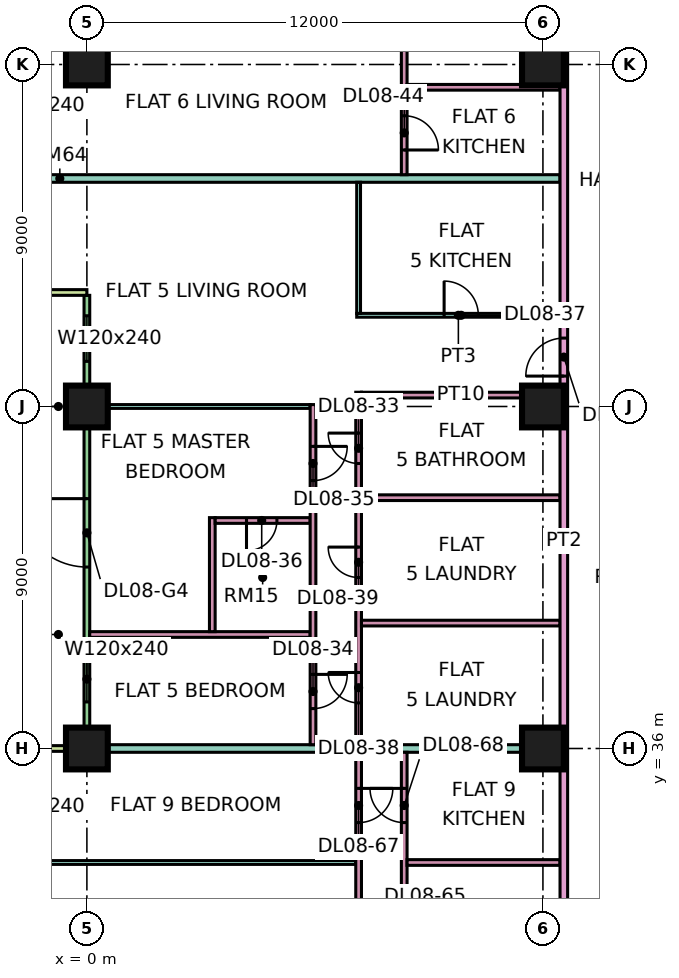
"""IFC4 building model, lengths in metres.
Left out: names, types, materials, properties, quantities, classifications, styles, units other than length and angle.
Written with IfcOpenShell. Run it as: python <this file> out.ifc"""

import sys

from ifc_helpers import new_model, si_unit, direction, frame, frame_2d, origin, origin_2d, place, context, subcontext, project, spatial, rectangle, extrude, element, fill, save


model = new_model("IFC4")
c1 = context("Model", 3, precision=1e-05, world=origin(), true_north=direction((0.0, 1.0)))
c2 = subcontext(c1, "Body", "Model", "MODEL_VIEW")
j1 = project(units=[si_unit("LENGTHUNIT", "METRE"), si_unit("PLANEANGLEUNIT", "RADIAN")], contexts=[c1])
p1 = place(None, origin())
s1 = spatial("IfcSite", under=j1, at=p1, CompositionType="ELEMENT")
p2 = place(p1, origin())
s2 = spatial("IfcBuilding", under=s1, at=p2, CompositionType="ELEMENT")
p3 = place(p2, frame((0.0, 0.0, 45.15)))
s3 = spatial("IfcBuildingStorey", under=s2, at=p3, CompositionType="ELEMENT", Elevation=45.15)
p4 = place(p3, frame((0.0, 36.0, 0.0), z_axis=(0.0, 0.0, 1.0), x_axis=(1.0, 0.0, 0.0)))
e1 = element("IfcColumn", 1, at=p4, inside=s3, PredefinedType="COLUMN", context=c2, shape_type="SweptSolid", body=[
    extrude(rectangle(XDim=1.1, YDim=1.1, at=origin_2d()), origin(), (0.0, 0.0, 1.0), 3.75),
])
for number, where, z_axis, x_axis in (
    (2, (0.0, 45.0, 0.0), (0.0, 0.0, 1.0), (1.0, 0.0, 0.0)),
    (3, (0.0, 54.0, 0.0), (0.0, 0.0, 1.0), (1.0, 0.0, 0.0)),
    (4, (12.0, 36.0, 0.0), (0.0, 0.0, 1.0), (1.0, 0.0, 0.0)),
    (5, (12.0, 45.0, 0.0), (0.0, 0.0, 1.0), (1.0, 0.0, 0.0)),
    (6, (12.0, 54.0, 0.0), (0.0, 0.0, 1.0), (1.0, 0.0, 0.0)),
):
    element("IfcColumn", number, at=place(p3, frame(where, z_axis=z_axis, x_axis=x_axis)), inside=s3, PredefinedType="COLUMN", context=c2, shape_type="SweptSolid", body=[
        extrude(rectangle(XDim=1.1, YDim=1.1, at=origin_2d()), origin(), (0.0, 0.0, 1.0), 3.75),
    ])
p5 = place(p3, frame((0.0, 47.925, 0.0), z_axis=(0.0, 0.0, 1.0), x_axis=(0.0, -1.0, 0.0)))
e7 = element("IfcWall", 7, at=p5, inside=s3, PredefinedType="SOLIDWALL", context=c2, shape_type="SweptSolid", body=[
    extrude(rectangle(XDim=11.85, YDim=0.15, at=frame_2d((5.925, 0.0))), origin(), (0.0, 0.0, 1.0), 3.35),
])
p6 = place(p5, frame((0.538, 0.0, 0.45)))
e8 = element("IfcOpeningElement", 8, at=p6, cuts=e7, PredefinedType="OPENING", context=c2, shape_type="SweptSolid", body=[
    extrude(rectangle(XDim=1.2, YDim=2.4, at=frame_2d((0.6, 1.2))), frame((0.0, 0.085, 0.0), z_axis=(0.0, -1.0, 0.0), x_axis=(1.0, 0.0, 0.0)), (0.0, 0.0, 1.0), 0.17),
])
p7 = place(p5, frame((5.35, 0.0, 0.0)))
e9 = element("IfcOpeningElement", 9, at=p7, cuts=e7, PredefinedType="OPENING", context=c2, shape_type="SweptSolid", body=[
    extrude(rectangle(XDim=1.8, YDim=2.4, at=frame_2d((0.9, 1.2))), frame((0.0, 0.085, 0.0), z_axis=(0.0, -1.0, 0.0), x_axis=(1.0, 0.0, 0.0)), (0.0, 0.0, 1.0), 0.17),
])
p8 = place(p5, frame((9.5, 0.0, 0.45)))
e10 = element("IfcOpeningElement", 10, at=p8, cuts=e7, PredefinedType="OPENING", context=c2, shape_type="SweptSolid", body=[
    extrude(rectangle(XDim=1.2, YDim=2.4, at=frame_2d((0.6, 1.2))), frame((0.0, 0.085, 0.0), z_axis=(0.0, -1.0, 0.0), x_axis=(1.0, 0.0, 0.0)), (0.0, 0.0, 1.0), 0.17),
])
for number, where, z_axis, x_axis in (
    (11, (-1.5, 48.0, 0.0), (0.0, 0.0, 1.0), (1.0, 0.0, 0.0)),
    (12, (-1.5, 36.0, 0.0), (0.0, 0.0, 1.0), (1.0, 0.0, 0.0)),
):
    element("IfcWall", number, at=place(p3, frame(where, z_axis=z_axis, x_axis=x_axis)), inside=s3, PredefinedType="SOLIDWALL", context=c2, shape_type="SweptSolid", body=[
        extrude(rectangle(XDim=1.5, YDim=0.15, at=frame_2d((0.75, 0.0))), origin(), (0.0, 0.0, 1.0), 3.35),
    ])
p9 = place(p3, frame((-1.351, 33.0, 0.0), z_axis=(0.0, 0.0, 1.0), x_axis=(1.0, 0.0, 0.0)))
e13 = element("IfcWall", 13, at=p9, inside=s3, PredefinedType="PARTITIONING", context=c2, shape_type="SweptSolid", body=[
    extrude(rectangle(XDim=8.426, YDim=0.1, at=frame_2d((4.213, 0.0))), origin(), (0.0, 0.0, 1.0), 3.35),
])
e14 = element("IfcWall", 14, at=p4, inside=s3, PredefinedType="PARTITIONING", context=c2, shape_type="SweptSolid", body=[
    extrude(rectangle(XDim=12.45, YDim=0.2, at=frame_2d((6.225, 0.0))), origin(), (0.0, 0.0, 1.0), 3.35),
])
p10 = place(p3, frame((-1.35, 51.0, 0.0), z_axis=(0.0, 0.0, 1.0), x_axis=(1.0, 0.0, 0.0)))
e15 = element("IfcWall", 15, at=p10, inside=s3, PredefinedType="PARTITIONING", context=c2, shape_type="SweptSolid", body=[
    extrude(rectangle(XDim=13.8, YDim=0.2, at=frame_2d((6.9, 0.0))), origin(), (0.0, 0.0, 1.0), 3.35),
])
p11 = place(p3, frame((0.074, 39.0, 0.0), z_axis=(0.0, 0.0, 1.0), x_axis=(1.0, 0.0, 0.0)))
e16 = element("IfcWall", 16, at=p11, inside=s3, PredefinedType="PARTITIONING", context=c2, shape_type="SweptSolid", body=[
    extrude(rectangle(XDim=5.801, YDim=0.15, at=frame_2d((2.9, 0.0))), origin(), (0.0, 0.0, 1.0), 3.35),
])
p12 = place(p3, frame((0.074, 45.0, 0.0), z_axis=(0.0, 0.0, 1.0), x_axis=(1.0, 0.0, 0.0)))
e17 = element("IfcWall", 17, at=p12, inside=s3, PredefinedType="PARTITIONING", context=c2, shape_type="SweptSolid", body=[
    extrude(rectangle(XDim=5.801, YDim=0.1, at=frame_2d((2.9, 0.0))), origin(), (0.0, 0.0, 1.0), 3.35),
])
p13 = place(p3, frame((3.3, 39.075, 0.0), z_axis=(0.0, 0.0, 1.0), x_axis=(0.0, 1.0, 0.0)))
e18 = element("IfcWall", 18, at=p13, inside=s3, PredefinedType="PARTITIONING", context=c2, shape_type="SweptSolid", body=[
    extrude(rectangle(XDim=3.0, YDim=0.15, at=frame_2d((1.5, 0.0))), origin(), (0.0, 0.0, 1.0), 3.35),
])
p14 = place(p3, frame((3.375, 42.0, 0.0), z_axis=(0.0, 0.0, 1.0), x_axis=(1.0, 0.0, 0.0)))
e19 = element("IfcWall", 19, at=p14, inside=s3, PredefinedType="PARTITIONING", context=c2, shape_type="SweptSolid", body=[
    extrude(rectangle(XDim=2.5, YDim=0.15, at=frame_2d((1.25, 0.0))), origin(), (0.0, 0.0, 1.0), 3.35),
])
p15 = place(p14, frame((0.825, 0.0, 0.0)))
e20 = element("IfcOpeningElement", 20, at=p15, cuts=e19, PredefinedType="OPENING", context=c2, shape_type="SweptSolid", body=[
    extrude(rectangle(XDim=0.8, YDim=2.1, at=frame_2d((0.4, 1.05))), frame((0.0, 0.085, 0.0), z_axis=(0.0, -1.0, 0.0), x_axis=(1.0, 0.0, 0.0)), (0.0, 0.0, 1.0), 0.17),
])
p16 = place(p3, frame((5.95, 36.1, 0.0), z_axis=(0.0, 0.0, 1.0), x_axis=(0.0, 1.0, 0.0)))
e21 = element("IfcWall", 21, at=p16, inside=s3, PredefinedType="PARTITIONING", context=c2, shape_type="SweptSolid", body=[
    extrude(rectangle(XDim=8.95, YDim=0.15, at=frame_2d((4.475, 0.0))), origin(), (0.0, 0.0, 1.0), 3.35),
])
p17 = place(p16, frame((0.95, 0.0, 0.0)))
e22 = element("IfcOpeningElement", 22, at=p17, cuts=e21, PredefinedType="OPENING", context=c2, shape_type="SweptSolid", body=[
    extrude(rectangle(XDim=0.9, YDim=2.1, at=frame_2d((0.45, 1.05))), frame((0.0, 0.085, 0.0), z_axis=(0.0, -1.0, 0.0), x_axis=(1.0, 0.0, 0.0)), (0.0, 0.0, 1.0), 0.17),
])
p18 = place(p16, frame((6.95, 0.0, 0.0)))
e23 = element("IfcOpeningElement", 23, at=p18, cuts=e21, PredefinedType="OPENING", context=c2, shape_type="SweptSolid", body=[
    extrude(rectangle(XDim=0.9, YDim=2.1, at=frame_2d((0.45, 1.05))), frame((0.0, 0.085, 0.0), z_axis=(0.0, -1.0, 0.0), x_axis=(1.0, 0.0, 0.0)), (0.0, 0.0, 1.0), 0.17),
])
p19 = place(p3, frame((7.1, 47.4, 0.0), z_axis=(0.0, 0.0, 1.0), x_axis=(1.0, 0.0, 0.0)))
e24 = element("IfcWall", 24, at=p19, inside=s3, PredefinedType="PARTITIONING", context=c2, shape_type="SweptSolid", body=[
    extrude(rectangle(XDim=5.35, YDim=0.1, at=frame_2d((2.675, 0.0))), origin(), (0.0, 0.0, 1.0), 3.35),
])
p20 = place(p19, frame((2.3, 0.0, 0.0)))
e25 = element("IfcOpeningElement", 25, at=p20, cuts=e24, PredefinedType="OPENING", context=c2, shape_type="SweptSolid", body=[
    extrude(rectangle(XDim=0.9, YDim=2.1, at=frame_2d((0.45, 1.05))), frame((0.0, 0.06, 0.0), z_axis=(0.0, -1.0, 0.0), x_axis=(1.0, 0.0, 0.0)), (0.0, 0.0, 1.0), 0.12),
])
p21 = place(p3, frame((7.15, 29.95, 0.0), z_axis=(0.0, 0.0, 1.0), x_axis=(0.0, 1.0, 0.0)))
e26 = element("IfcWall", 26, at=p21, inside=s3, PredefinedType="PARTITIONING", context=c2, shape_type="SweptSolid", body=[
    extrude(rectangle(XDim=5.95, YDim=0.15, at=frame_2d((2.975, 0.0))), origin(), (0.0, 0.0, 1.0), 3.35),
])
p22 = place(p21, frame((1.1, 0.0, 0.0)))
e27 = element("IfcOpeningElement", 27, at=p22, cuts=e26, PredefinedType="OPENING", context=c2, shape_type="SweptSolid", body=[
    extrude(rectangle(XDim=0.9, YDim=2.1, at=frame_2d((0.45, 1.05))), frame((0.0, 0.085, 0.0), z_axis=(0.0, -1.0, 0.0), x_axis=(1.0, 0.0, 0.0)), (0.0, 0.0, 1.0), 0.17),
])
p23 = place(p21, frame((4.1, 0.0, 0.0)))
e28 = element("IfcOpeningElement", 28, at=p23, cuts=e26, PredefinedType="OPENING", context=c2, shape_type="SweptSolid", body=[
    extrude(rectangle(XDim=0.9, YDim=2.1, at=frame_2d((0.45, 1.05))), frame((0.0, 0.085, 0.0), z_axis=(0.0, -1.0, 0.0), x_axis=(1.0, 0.0, 0.0)), (0.0, 0.0, 1.0), 0.17),
])
p24 = place(p3, frame((7.15, 36.1, 0.0), z_axis=(0.0, 0.0, 1.0), x_axis=(0.0, 1.0, 0.0)))
e29 = element("IfcWall", 29, at=p24, inside=s3, PredefinedType="PARTITIONING", context=c2, shape_type="SweptSolid", body=[
    extrude(rectangle(XDim=9.275, YDim=0.15, at=frame_2d((4.637, 0.0))), origin(), (0.0, 0.0, 1.0), 3.35),
])
p25 = place(p24, frame((7.4, 0.0, 0.0)))
e30 = element("IfcOpeningElement", 30, at=p25, cuts=e29, PredefinedType="OPENING", context=c2, shape_type="SweptSolid", body=[
    extrude(rectangle(XDim=0.8, YDim=2.1, at=frame_2d((0.4, 1.05))), frame((0.0, 0.085, 0.0), z_axis=(0.0, -1.0, 0.0), x_axis=(1.0, 0.0, 0.0)), (0.0, 0.0, 1.0), 0.17),
])
p26 = place(p24, frame((1.1, 0.0, 0.0)))
e31 = element("IfcOpeningElement", 31, at=p26, cuts=e29, PredefinedType="OPENING", context=c2, shape_type="SweptSolid", body=[
    extrude(rectangle(XDim=0.8, YDim=2.1, at=frame_2d((0.4, 1.05))), frame((0.0, 0.085, 0.0), z_axis=(0.0, -1.0, 0.0), x_axis=(1.0, 0.0, 0.0)), (0.0, 0.0, 1.0), 0.17),
])
p27 = place(p24, frame((4.4, 0.0, 0.0)))
e32 = element("IfcOpeningElement", 32, at=p27, cuts=e29, PredefinedType="OPENING", context=c2, shape_type="SweptSolid", body=[
    extrude(rectangle(XDim=0.8, YDim=2.1, at=frame_2d((0.4, 1.05))), frame((0.0, 0.085, 0.0), z_axis=(0.0, -1.0, 0.0), x_axis=(1.0, 0.0, 0.0)), (0.0, 0.0, 1.0), 0.17),
])
p28 = place(p3, frame((7.15, 47.45, 0.0), z_axis=(0.0, 0.0, 1.0), x_axis=(0.0, 1.0, 0.0)))
e33 = element("IfcWall", 33, at=p28, inside=s3, PredefinedType="PARTITIONING", context=c2, shape_type="SweptSolid", body=[
    extrude(rectangle(XDim=3.45, YDim=0.1, at=frame_2d((1.725, 0.0))), origin(), (0.0, 0.0, 1.0), 3.35),
])
for number, where, z_axis, x_axis in (
    (34, (7.225, 39.3, 0.0), (0.0, 0.0, 1.0), (1.0, 0.0, 0.0)),
    (35, (7.225, 42.6, 0.0), (0.0, 0.0, 1.0), (1.0, 0.0, 0.0)),
    (36, (7.225, 45.3, 0.0), (0.0, 0.0, 1.0), (1.0, 0.0, 0.0)),
):
    element("IfcWall", number, at=place(p3, frame(where, z_axis=z_axis, x_axis=x_axis)), inside=s3, PredefinedType="PARTITIONING", context=c2, shape_type="SweptSolid", body=[
        extrude(rectangle(XDim=5.225, YDim=0.15, at=frame_2d((2.612, 0.0))), origin(), (0.0, 0.0, 1.0), 3.35),
    ])
p29 = place(p3, frame((8.35, 26.325, 0.0), z_axis=(0.0, 0.0, 1.0), x_axis=(0.0, 1.0, 0.0)))
e37 = element("IfcWall", 37, at=p29, inside=s3, PredefinedType="PARTITIONING", context=c2, shape_type="SweptSolid", body=[
    extrude(rectangle(XDim=9.575, YDim=0.15, at=frame_2d((4.788, 0.0))), origin(), (0.0, 0.0, 1.0), 3.35),
])
p30 = place(p29, frame((4.425, 0.0, 0.0)))
e38 = element("IfcOpeningElement", 38, at=p30, cuts=e37, PredefinedType="OPENING", context=c2, shape_type="SweptSolid", body=[
    extrude(rectangle(XDim=0.8, YDim=2.1, at=frame_2d((0.4, 1.05))), frame((0.0, 0.085, 0.0), z_axis=(0.0, -1.0, 0.0), x_axis=(1.0, 0.0, 0.0)), (0.0, 0.0, 1.0), 0.17),
])
p31 = place(p29, frame((7.725, 0.0, 0.0)))
e39 = element("IfcOpeningElement", 39, at=p31, cuts=e37, PredefinedType="OPENING", context=c2, shape_type="SweptSolid", body=[
    extrude(rectangle(XDim=0.9, YDim=2.1, at=frame_2d((0.45, 1.05))), frame((0.0, 0.085, 0.0), z_axis=(0.0, -1.0, 0.0), x_axis=(1.0, 0.0, 0.0)), (0.0, 0.0, 1.0), 0.17),
])
p32 = place(p29, frame((1.125, 0.0, 0.0)))
e40 = element("IfcOpeningElement", 40, at=p32, cuts=e37, PredefinedType="OPENING", context=c2, shape_type="SweptSolid", body=[
    extrude(rectangle(XDim=0.8, YDim=2.1, at=frame_2d((0.4, 1.05))), frame((0.0, 0.085, 0.0), z_axis=(0.0, -1.0, 0.0), x_axis=(1.0, 0.0, 0.0)), (0.0, 0.0, 1.0), 0.17),
])
p33 = place(p3, frame((8.35, 51.1, 0.0), z_axis=(0.0, 0.0, 1.0), x_axis=(0.0, 1.0, 0.0)))
e41 = element("IfcWall", 41, at=p33, inside=s3, PredefinedType="PARTITIONING", context=c2, shape_type="SweptSolid", body=[
    extrude(rectangle(XDim=5.675, YDim=0.15, at=frame_2d((2.837, 0.0))), origin(), (0.0, 0.0, 1.0), 3.35),
])
p34 = place(p33, frame((0.65, 0.0, 0.0)))
e42 = element("IfcOpeningElement", 42, at=p34, cuts=e41, PredefinedType="OPENING", context=c2, shape_type="SweptSolid", body=[
    extrude(rectangle(XDim=0.9, YDim=2.1, at=frame_2d((0.45, 1.05))), frame((0.0, 0.085, 0.0), z_axis=(0.0, -1.0, 0.0), x_axis=(1.0, 0.0, 0.0)), (0.0, 0.0, 1.0), 0.17),
])
for number, where, z_axis, x_axis in (
    (43, (8.425, 33.0, 0.0), (0.0, 0.0, 1.0), (1.0, 0.0, 0.0)),
    (44, (8.425, 53.4, 0.0), (0.0, 0.0, 1.0), (1.0, 0.0, 0.0)),
):
    element("IfcWall", number, at=place(p3, frame(where, z_axis=z_axis, x_axis=x_axis)), inside=s3, PredefinedType="PARTITIONING", context=c2, shape_type="SweptSolid", body=[
        extrude(rectangle(XDim=4.025, YDim=0.15, at=frame_2d((2.012, 0.0))), origin(), (0.0, 0.0, 1.0), 3.35),
    ])
p35 = place(p3, frame((12.55, 20.0, 0.0), z_axis=(0.0, 0.0, 1.0), x_axis=(0.0, 1.0, 0.0)))
e45 = element("IfcWall", 45, at=p35, inside=s3, PredefinedType="PARTITIONING", context=c2, shape_type="SweptSolid", body=[
    extrude(rectangle(XDim=42.926, YDim=0.2, at=frame_2d((21.463, 0.0))), origin(), (0.0, 0.0, 1.0), 3.35),
])
p36 = place(p35, frame((25.8, 0.0, 0.0)))
e46 = element("IfcOpeningElement", 46, at=p36, cuts=e45, PredefinedType="OPENING", context=c2, shape_type="SweptSolid", body=[
    extrude(rectangle(XDim=1.0, YDim=2.1, at=frame_2d((0.5, 1.05))), frame((0.0, 0.11, 0.0), z_axis=(0.0, -1.0, 0.0), x_axis=(1.0, 0.0, 0.0)), (0.0, 0.0, 1.0), 0.22),
])
p37 = place(p35, frame((37.65, 0.0, 0.0)))
e47 = element("IfcOpeningElement", 47, at=p37, cuts=e45, PredefinedType="OPENING", context=c2, shape_type="SweptSolid", body=[
    extrude(rectangle(XDim=1.0, YDim=2.1, at=frame_2d((0.5, 1.05))), frame((0.0, 0.11, 0.0), z_axis=(0.0, -1.0, 0.0), x_axis=(1.0, 0.0, 0.0)), (0.0, 0.0, 1.0), 0.22),
])
p38 = place(p35, frame((0.6, 0.0, 0.0)))
e48 = element("IfcOpeningElement", 48, at=p38, cuts=e45, PredefinedType="OPENING", context=c2, shape_type="SweptSolid", body=[
    extrude(rectangle(XDim=1.2, YDim=2.1, at=frame_2d((0.6, 1.05))), frame((0.0, 0.11, 0.0), z_axis=(0.0, -1.0, 0.0), x_axis=(1.0, 0.0, 0.0)), (0.0, 0.0, 1.0), 0.22),
])
p39 = place(p35, frame((4.65, 0.0, 0.0)))
e49 = element("IfcOpeningElement", 49, at=p39, cuts=e45, PredefinedType="OPENING", context=c2, shape_type="SweptSolid", body=[
    extrude(rectangle(XDim=1.0, YDim=2.1, at=frame_2d((0.5, 1.05))), frame((0.0, 0.11, 0.0), z_axis=(0.0, -1.0, 0.0), x_axis=(1.0, 0.0, 0.0)), (0.0, 0.0, 1.0), 0.22),
])
p40 = place(p6, origin())
e50 = element("IfcWindow", 50, at=p40, inside=s3, PartitioningType="SINGLE_PANEL", PredefinedType="WINDOW", context=c2, shape_type="SweptSolid", body=[
    extrude(rectangle(XDim=1.2, YDim=2.4, at=frame_2d((0.6, 1.2))), frame((0.0, 0.03, 0.0), z_axis=(0.0, -1.0, 0.0), x_axis=(1.0, 0.0, 0.0)), (0.0, 0.0, 1.0), 0.06),
])
fill(e8, e50)
p41 = place(p7, frame((1.8, 0.0, 0.0), z_axis=(0.0, 0.0, 1.0), x_axis=(-1.0, 0.0, 0.0)))
e51 = element("IfcDoor", 51, at=p41, inside=s3, OperationType="DOUBLE_DOOR_SINGLE_SWING", PredefinedType="DOOR", context=c2, shape_type="SweptSolid", body=[
    extrude(rectangle(XDim=1.8, YDim=2.4, at=frame_2d((0.9, 1.2))), frame((0.0, 0.025, 0.0), z_axis=(0.0, -1.0, 0.0), x_axis=(1.0, 0.0, 0.0)), (0.0, 0.0, 1.0), 0.05),
])
fill(e9, e51)
p42 = place(p8, origin())
e52 = element("IfcWindow", 52, at=p42, inside=s3, PartitioningType="SINGLE_PANEL", PredefinedType="WINDOW", context=c2, shape_type="SweptSolid", body=[
    extrude(rectangle(XDim=1.2, YDim=2.4, at=frame_2d((0.6, 1.2))), frame((0.0, 0.03, 0.0), z_axis=(0.0, -1.0, 0.0), x_axis=(1.0, 0.0, 0.0)), (0.0, 0.0, 1.0), 0.06),
])
fill(e10, e52)
p43 = place(p25, frame((0.8, 0.0, 0.0), z_axis=(0.0, 0.0, 1.0), x_axis=(-1.0, 0.0, 0.0)))
e53 = element("IfcDoor", 53, at=p43, inside=s3, OperationType="SINGLE_SWING_RIGHT", PredefinedType="DOOR", context=c2, shape_type="SweptSolid", body=[
    extrude(rectangle(XDim=0.8, YDim=2.1, at=frame_2d((0.4, 1.05))), frame((0.0, 0.025, 0.0), z_axis=(0.0, -1.0, 0.0), x_axis=(1.0, 0.0, 0.0)), (0.0, 0.0, 1.0), 0.05),
])
fill(e30, e53)
p44 = place(p17, origin())
e54 = element("IfcDoor", 54, at=p44, inside=s3, OperationType="SINGLE_SWING_RIGHT", PredefinedType="DOOR", context=c2, shape_type="SweptSolid", body=[
    extrude(rectangle(XDim=0.9, YDim=2.1, at=frame_2d((0.45, 1.05))), frame((0.0, 0.025, 0.0), z_axis=(0.0, -1.0, 0.0), x_axis=(1.0, 0.0, 0.0)), (0.0, 0.0, 1.0), 0.05),
])
fill(e22, e54)
p45 = place(p18, origin())
e55 = element("IfcDoor", 55, at=p45, inside=s3, OperationType="SINGLE_SWING_RIGHT", PredefinedType="DOOR", context=c2, shape_type="SweptSolid", body=[
    extrude(rectangle(XDim=0.9, YDim=2.1, at=frame_2d((0.45, 1.05))), frame((0.0, 0.025, 0.0), z_axis=(0.0, -1.0, 0.0), x_axis=(1.0, 0.0, 0.0)), (0.0, 0.0, 1.0), 0.05),
])
fill(e23, e55)
p46 = place(p15, frame((0.8, 0.0, 0.0), z_axis=(0.0, 0.0, 1.0), x_axis=(-1.0, 0.0, 0.0)))
e56 = element("IfcDoor", 56, at=p46, inside=s3, OperationType="SINGLE_SWING_LEFT", PredefinedType="DOOR", context=c2, shape_type="SweptSolid", body=[
    extrude(rectangle(XDim=0.8, YDim=2.1, at=frame_2d((0.4, 1.05))), frame((0.0, 0.025, 0.0), z_axis=(0.0, -1.0, 0.0), x_axis=(1.0, 0.0, 0.0)), (0.0, 0.0, 1.0), 0.05),
])
fill(e20, e56)
p47 = place(p20, origin())
e57 = element("IfcDoor", 57, at=p47, inside=s3, OperationType="SINGLE_SWING_LEFT", PredefinedType="DOOR", context=c2, shape_type="SweptSolid", body=[
    extrude(rectangle(XDim=0.9, YDim=2.1, at=frame_2d((0.45, 1.05))), frame((0.0, 0.025, 0.0), z_axis=(0.0, -1.0, 0.0), x_axis=(1.0, 0.0, 0.0)), (0.0, 0.0, 1.0), 0.05),
])
fill(e25, e57)
p48 = place(p26, frame((0.8, 0.0, 0.0), z_axis=(0.0, 0.0, 1.0), x_axis=(-1.0, 0.0, 0.0)))
e58 = element("IfcDoor", 58, at=p48, inside=s3, OperationType="SINGLE_SWING_RIGHT", PredefinedType="DOOR", context=c2, shape_type="SweptSolid", body=[
    extrude(rectangle(XDim=0.8, YDim=2.1, at=frame_2d((0.4, 1.05))), frame((0.0, 0.025, 0.0), z_axis=(0.0, -1.0, 0.0), x_axis=(1.0, 0.0, 0.0)), (0.0, 0.0, 1.0), 0.05),
])
fill(e31, e58)
p49 = place(p27, frame((0.8, 0.0, 0.0), z_axis=(0.0, 0.0, 1.0), x_axis=(-1.0, 0.0, 0.0)))
e59 = element("IfcDoor", 59, at=p49, inside=s3, OperationType="SINGLE_SWING_RIGHT", PredefinedType="DOOR", context=c2, shape_type="SweptSolid", body=[
    extrude(rectangle(XDim=0.8, YDim=2.1, at=frame_2d((0.4, 1.05))), frame((0.0, 0.025, 0.0), z_axis=(0.0, -1.0, 0.0), x_axis=(1.0, 0.0, 0.0)), (0.0, 0.0, 1.0), 0.05),
])
fill(e32, e59)
p50 = place(p36, origin())
e60 = element("IfcDoor", 60, at=p50, inside=s3, OperationType="SINGLE_SWING_LEFT", PredefinedType="DOOR", context=c2, shape_type="SweptSolid", body=[
    extrude(rectangle(XDim=1.0, YDim=2.1, at=frame_2d((0.5, 1.05))), frame((0.0, 0.025, 0.0), z_axis=(0.0, -1.0, 0.0), x_axis=(1.0, 0.0, 0.0)), (0.0, 0.0, 1.0), 0.05),
])
fill(e46, e60)
p51 = place(p34, frame((0.9, 0.0, 0.0), z_axis=(0.0, 0.0, 1.0), x_axis=(-1.0, 0.0, 0.0)))
e61 = element("IfcDoor", 61, at=p51, inside=s3, OperationType="SINGLE_SWING_LEFT", PredefinedType="DOOR", context=c2, shape_type="SweptSolid", body=[
    extrude(rectangle(XDim=0.9, YDim=2.1, at=frame_2d((0.45, 1.05))), frame((0.0, 0.025, 0.0), z_axis=(0.0, -1.0, 0.0), x_axis=(1.0, 0.0, 0.0)), (0.0, 0.0, 1.0), 0.05),
])
fill(e42, e61)
p52 = place(p23, origin())
e62 = element("IfcDoor", 62, at=p52, inside=s3, OperationType="SINGLE_SWING_RIGHT", PredefinedType="DOOR", context=c2, shape_type="SweptSolid", body=[
    extrude(rectangle(XDim=0.9, YDim=2.1, at=frame_2d((0.45, 1.05))), frame((0.0, 0.025, 0.0), z_axis=(0.0, -1.0, 0.0), x_axis=(1.0, 0.0, 0.0)), (0.0, 0.0, 1.0), 0.05),
])
fill(e28, e62)
p53 = place(p31, frame((0.9, 0.0, 0.0), z_axis=(0.0, 0.0, 1.0), x_axis=(-1.0, 0.0, 0.0)))
e63 = element("IfcDoor", 63, at=p53, inside=s3, OperationType="SINGLE_SWING_RIGHT", PredefinedType="DOOR", context=c2, shape_type="SweptSolid", body=[
    extrude(rectangle(XDim=0.9, YDim=2.1, at=frame_2d((0.45, 1.05))), frame((0.0, 0.025, 0.0), z_axis=(0.0, -1.0, 0.0), x_axis=(1.0, 0.0, 0.0)), (0.0, 0.0, 1.0), 0.05),
])
fill(e39, e63)
save(model, sys.argv[1])
